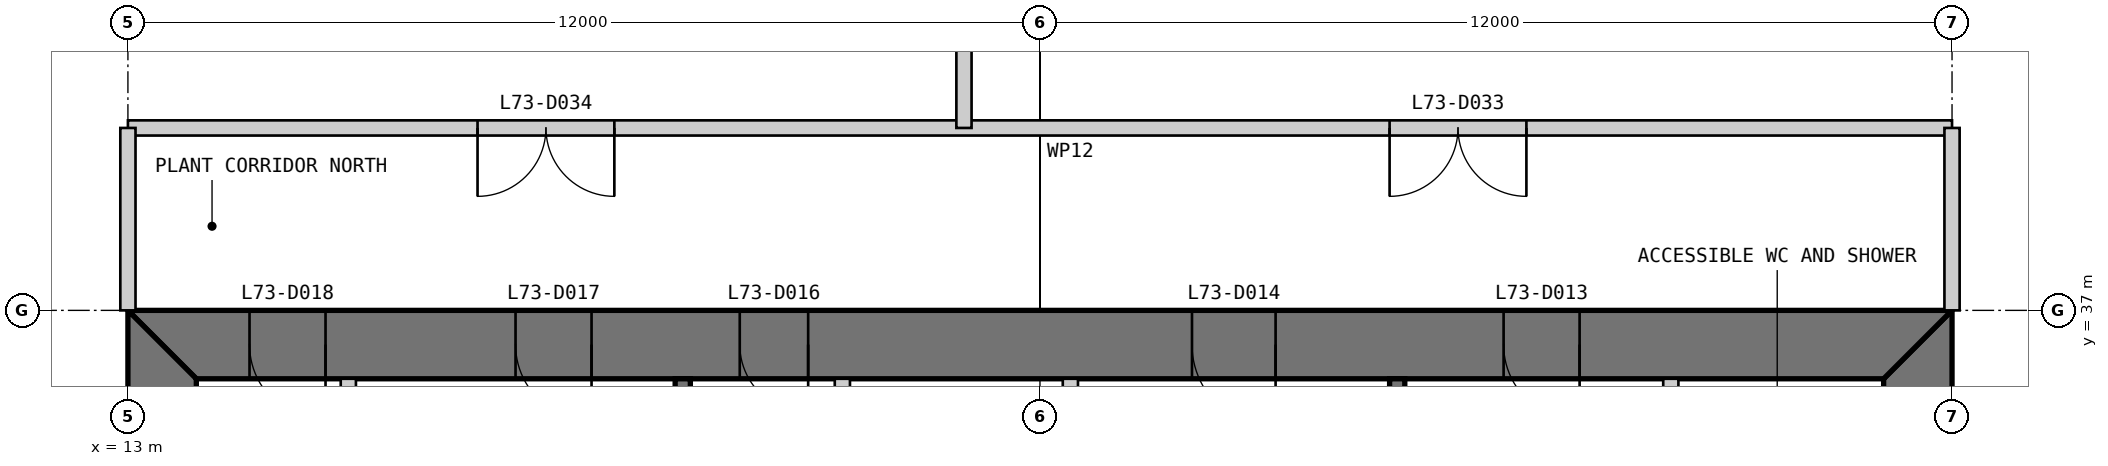
"""IFC4 building model, lengths in metres.
Left out: names, types, materials, properties, quantities, classifications, styles, units other than length and angle.
Written with IfcOpenShell. Run it as: python <this file> out.ifc"""

import sys

from ifc_helpers import new_model, si_unit, direction, frame, frame_2d, origin, place, context, subcontext, project, spatial, polyline, rectangle, outline, extrude, element, fill, save


model = new_model("IFC4")
c1 = context("Model", 3, precision=1e-05, world=origin(), true_north=direction((0.0, 1.0)))
c2 = subcontext(c1, "Body", "Model", "MODEL_VIEW")
j1 = project(units=[si_unit("LENGTHUNIT", "METRE"), si_unit("PLANEANGLEUNIT", "RADIAN")], contexts=[c1])
p1 = place(None, origin())
s1 = spatial("IfcSite", under=j1, at=p1, CompositionType="ELEMENT")
p2 = place(p1, origin())
s2 = spatial("IfcBuilding", under=s1, at=p2, CompositionType="ELEMENT")
p3 = place(p2, frame((0.0, 0.0, 301.8)))
s3 = spatial("IfcBuildingStorey", under=s2, at=p3, CompositionType="ELEMENT", Elevation=301.8)
p4 = place(p3, frame((36.55, 13.9, 0.0), z_axis=(0.0, 0.0, 1.0), x_axis=(0.0, 1.0, 0.0)))
e1 = element("IfcWall", 1, at=p4, inside=s3, PredefinedType="SHEAR", context=c2, shape_type="SweptSolid", body=[
    extrude(outline(polyline([(-0.9, -0.45), (23.1, -0.45), (22.2, 0.45), (0.0, 0.45), (-0.9, -0.45)])), origin(), (0.0, 0.0, 1.0), 6.0),
])
p5 = place(p4, frame((20.2, 0.0, 0.0)))
e2 = element("IfcOpeningElement", 2, at=p5, cuts=e1, PredefinedType="OPENING", context=c2, shape_type="SweptSolid", body=[
    extrude(rectangle(XDim=1.0, YDim=2.2, at=frame_2d((0.5, 1.1))), frame((0.0, 0.46, 0.0), z_axis=(0.0, -1.0, 0.0), x_axis=(1.0, 0.0, 0.0)), (0.0, 0.0, 1.0), 0.92),
])
p6 = place(p4, frame((17.25, 0.0, 0.0)))
e3 = element("IfcOpeningElement", 3, at=p6, cuts=e1, PredefinedType="OPENING", context=c2, shape_type="SweptSolid", body=[
    extrude(rectangle(XDim=0.9, YDim=2.2, at=frame_2d((0.45, 1.1))), frame((0.0, 0.46, 0.0), z_axis=(0.0, -1.0, 0.0), x_axis=(1.0, 0.0, 0.0)), (0.0, 0.0, 1.0), 0.92),
])
p7 = place(p3, frame((37.0, 36.55, 0.0), z_axis=(0.0, 0.0, 1.0), x_axis=(-1.0, 0.0, 0.0)))
e4 = element("IfcWall", 4, at=p7, inside=s3, PredefinedType="SHEAR", context=c2, shape_type="SweptSolid", body=[
    extrude(outline(polyline([(0.0, -0.45), (24.0, -0.45), (23.1, 0.45), (0.9, 0.45), (0.0, -0.45)])), origin(), (0.0, 0.0, 1.0), 6.0),
])
p8 = place(p7, frame((4.9, 0.0, 0.0)))
e5 = element("IfcOpeningElement", 5, at=p8, cuts=e4, PredefinedType="OPENING", context=c2, shape_type="SweptSolid", body=[
    extrude(rectangle(XDim=1.0, YDim=2.2, at=frame_2d((0.5, 1.1))), frame((0.0, 0.46, 0.0), z_axis=(0.0, -1.0, 0.0), x_axis=(1.0, 0.0, 0.0)), (0.0, 0.0, 1.0), 0.92),
])
p9 = place(p7, frame((8.9, 0.0, 0.0)))
e6 = element("IfcOpeningElement", 6, at=p9, cuts=e4, PredefinedType="OPENING", context=c2, shape_type="SweptSolid", body=[
    extrude(rectangle(XDim=1.1, YDim=2.2, at=frame_2d((0.55, 1.1))), frame((0.0, 0.46, 0.0), z_axis=(0.0, -1.0, 0.0), x_axis=(1.0, 0.0, 0.0)), (0.0, 0.0, 1.0), 0.92),
])
p10 = place(p7, frame((15.05, 0.0, 0.0)))
e7 = element("IfcOpeningElement", 7, at=p10, cuts=e4, PredefinedType="OPENING", context=c2, shape_type="SweptSolid", body=[
    extrude(rectangle(XDim=0.9, YDim=2.2, at=frame_2d((0.45, 1.1))), frame((0.0, 0.46, 0.0), z_axis=(0.0, -1.0, 0.0), x_axis=(1.0, 0.0, 0.0)), (0.0, 0.0, 1.0), 0.92),
])
p11 = place(p7, frame((17.9, 0.0, 0.0)))
e8 = element("IfcOpeningElement", 8, at=p11, cuts=e4, PredefinedType="OPENING", context=c2, shape_type="SweptSolid", body=[
    extrude(rectangle(XDim=1.0, YDim=2.2, at=frame_2d((0.5, 1.1))), frame((0.0, 0.46, 0.0), z_axis=(0.0, -1.0, 0.0), x_axis=(1.0, 0.0, 0.0)), (0.0, 0.0, 1.0), 0.92),
])
p12 = place(p7, frame((21.4, 0.0, 0.0)))
e9 = element("IfcOpeningElement", 9, at=p12, cuts=e4, PredefinedType="OPENING", context=c2, shape_type="SweptSolid", body=[
    extrude(rectangle(XDim=1.0, YDim=2.2, at=frame_2d((0.5, 1.1))), frame((0.0, 0.46, 0.0), z_axis=(0.0, -1.0, 0.0), x_axis=(1.0, 0.0, 0.0)), (0.0, 0.0, 1.0), 0.92),
])
p13 = place(p3, frame((13.45, 36.1, 0.0), z_axis=(0.0, 0.0, 1.0), x_axis=(0.0, -1.0, 0.0)))
e10 = element("IfcWall", 10, at=p13, inside=s3, PredefinedType="SHEAR", context=c2, shape_type="SweptSolid", body=[
    extrude(outline(polyline([(-0.9, -0.45), (23.1, -0.45), (22.2, 0.45), (0.0, 0.45), (-0.9, -0.45)])), origin(), (0.0, 0.0, 1.0), 6.0),
])
p14 = place(p13, frame((20.2, 0.0, 0.0)))
e11 = element("IfcOpeningElement", 11, at=p14, cuts=e10, PredefinedType="OPENING", context=c2, shape_type="SweptSolid", body=[
    extrude(rectangle(XDim=1.0, YDim=2.2, at=frame_2d((0.5, 1.1))), frame((0.0, 0.46, 0.0), z_axis=(0.0, -1.0, 0.0), x_axis=(1.0, 0.0, 0.0)), (0.0, 0.0, 1.0), 0.92),
])
p15 = place(p13, frame((17.25, 0.0, 0.0)))
e12 = element("IfcOpeningElement", 12, at=p15, cuts=e10, PredefinedType="OPENING", context=c2, shape_type="SweptSolid", body=[
    extrude(rectangle(XDim=0.9, YDim=2.2, at=frame_2d((0.45, 1.1))), frame((0.0, 0.46, 0.0), z_axis=(0.0, -1.0, 0.0), x_axis=(1.0, 0.0, 0.0)), (0.0, 0.0, 1.0), 0.92),
])
p16 = place(p3, frame((33.3, 36.1, 0.0), z_axis=(0.0, 0.0, 1.0), x_axis=(0.0, -1.0, 0.0)))
e13 = element("IfcWall", 13, at=p16, inside=s3, PredefinedType="PARTITIONING", context=c2, shape_type="SweptSolid", body=[
    extrude(rectangle(XDim=16.1, YDim=0.2, at=frame_2d((8.05, 0.0))), origin(), (0.0, 0.0, 1.0), 5.8),
])
p17 = place(p3, frame((29.7, 36.1, 0.0), z_axis=(0.0, 0.0, 1.0), x_axis=(0.0, -1.0, 0.0)))
e14 = element("IfcWall", 14, at=p17, inside=s3, PredefinedType="SOLIDWALL", context=c2, shape_type="SweptSolid", body=[
    extrude(rectangle(XDim=16.1, YDim=0.2, at=frame_2d((8.05, 0.0))), origin(), (0.0, 0.0, 1.0), 5.8),
])
p18 = place(p17, frame((6.4, 0.0, 0.0)))
e15 = element("IfcOpeningElement", 15, at=p18, cuts=e14, PredefinedType="OPENING", context=c2, shape_type="SweptSolid", body=[
    extrude(rectangle(XDim=0.9, YDim=2.2, at=frame_2d((0.45, 1.1))), frame((0.0, 0.11, 0.0), z_axis=(0.0, -1.0, 0.0), x_axis=(1.0, 0.0, 0.0)), (0.0, 0.0, 1.0), 0.22),
])
p19 = place(p17, frame((11.4, 0.0, 0.0)))
e16 = element("IfcOpeningElement", 16, at=p19, cuts=e14, PredefinedType="OPENING", context=c2, shape_type="SweptSolid", body=[
    extrude(rectangle(XDim=0.9, YDim=2.2, at=frame_2d((0.45, 1.1))), frame((0.0, 0.11, 0.0), z_axis=(0.0, -1.0, 0.0), x_axis=(1.0, 0.0, 0.0)), (0.0, 0.0, 1.0), 0.22),
])
p20 = place(p3, frame((25.4, 36.1, 0.0), z_axis=(0.0, 0.0, 1.0), x_axis=(0.0, -1.0, 0.0)))
e17 = element("IfcWall", 17, at=p20, inside=s3, PredefinedType="PARTITIONING", context=c2, shape_type="SweptSolid", body=[
    extrude(rectangle(XDim=3.3, YDim=0.2, at=frame_2d((1.65, 0.0))), origin(), (0.0, 0.0, 1.0), 5.8),
])
p21 = place(p20, frame((0.9, 0.0, 0.0)))
e18 = element("IfcOpeningElement", 18, at=p21, cuts=e17, PredefinedType="OPENING", context=c2, shape_type="SweptSolid", body=[
    extrude(rectangle(XDim=1.1, YDim=2.2, at=frame_2d((0.55, 1.1))), frame((0.0, 0.11, 0.0), z_axis=(0.0, -1.0, 0.0), x_axis=(1.0, 0.0, 0.0)), (0.0, 0.0, 1.0), 0.22),
])
p22 = place(p3, frame((22.4, 36.1, 0.0), z_axis=(0.0, 0.0, 1.0), x_axis=(0.0, -1.0, 0.0)))
e19 = element("IfcWall", 19, at=p22, inside=s3, PredefinedType="PARTITIONING", context=c2, shape_type="SweptSolid", body=[
    extrude(rectangle(XDim=3.3, YDim=0.2, at=frame_2d((1.65, 0.0))), origin(), (0.0, 0.0, 1.0), 5.8),
])
p23 = place(p3, frame((20.3, 36.1, 0.0), z_axis=(0.0, 0.0, 1.0), x_axis=(0.0, -1.0, 0.0)))
e20 = element("IfcWall", 20, at=p23, inside=s3, PredefinedType="SOLIDWALL", context=c2, shape_type="SweptSolid", body=[
    extrude(rectangle(XDim=6.1, YDim=0.2, at=frame_2d((3.05, 0.0))), origin(), (0.0, 0.0, 1.0), 5.8),
])
p24 = place(p3, frame((15.9, 36.1, 0.0), z_axis=(0.0, 0.0, 1.0), x_axis=(0.0, -1.0, 0.0)))
e21 = element("IfcWall", 21, at=p24, inside=s3, PredefinedType="PARTITIONING", context=c2, shape_type="SweptSolid", body=[
    extrude(rectangle(XDim=6.1, YDim=0.2, at=frame_2d((3.05, 0.0))), origin(), (0.0, 0.0, 1.0), 5.8),
])
p25 = place(p3, frame((13.0, 39.4, 0.0), z_axis=(0.0, 0.0, 1.0), x_axis=(1.0, 0.0, 0.0)))
e22 = element("IfcWall", 22, at=p25, inside=s3, PredefinedType="PARTITIONING", context=c2, shape_type="SweptSolid", body=[
    extrude(rectangle(XDim=24.0, YDim=0.2, at=frame_2d((12.0, 0.0))), origin(), (0.0, 0.0, 1.0), 5.8),
])
p26 = place(p25, frame((16.6, 0.0, 0.0)))
e23 = element("IfcOpeningElement", 23, at=p26, cuts=e22, PredefinedType="OPENING", context=c2, shape_type="SweptSolid", body=[
    extrude(rectangle(XDim=1.8, YDim=2.4, at=frame_2d((0.9, 1.2))), frame((0.0, 0.11, 0.0), z_axis=(0.0, -1.0, 0.0), x_axis=(1.0, 0.0, 0.0)), (0.0, 0.0, 1.0), 0.22),
])
p27 = place(p25, frame((4.6, 0.0, 0.0)))
e24 = element("IfcOpeningElement", 24, at=p27, cuts=e22, PredefinedType="OPENING", context=c2, shape_type="SweptSolid", body=[
    extrude(rectangle(XDim=1.8, YDim=2.4, at=frame_2d((0.9, 1.2))), frame((0.0, 0.11, 0.0), z_axis=(0.0, -1.0, 0.0), x_axis=(1.0, 0.0, 0.0)), (0.0, 0.0, 1.0), 0.22),
])
for number, where, z_axis, x_axis in (
    (25, (13.0, 37.0, 0.0), (0.0, 0.0, 1.0), (0.0, 1.0, 0.0)),
    (26, (37.0, 37.0, 0.0), (0.0, 0.0, 1.0), (0.0, 1.0, 0.0)),
):
    element("IfcWall", number, at=place(p3, frame(where, z_axis=z_axis, x_axis=x_axis)), inside=s3, PredefinedType="PARTITIONING", context=c2, shape_type="SweptSolid", body=[
        extrude(rectangle(XDim=2.4, YDim=0.2, at=frame_2d((1.2, 0.0))), origin(), (0.0, 0.0, 1.0), 4.853),
    ])
p28 = place(p3, frame((24.0, 39.4, 0.0), z_axis=(0.0, 0.0, 1.0), x_axis=(0.0, 1.0, 0.0)))
e27 = element("IfcWall", 27, at=p28, inside=s3, PredefinedType="PARTITIONING", context=c2, shape_type="SweptSolid", body=[
    extrude(rectangle(XDim=10.6, YDim=0.2, at=frame_2d((5.3, 0.0))), origin(), (0.0, 0.0, 1.0), 5.8),
])
p29 = place(p28, frame((4.4, 0.0, 0.0)))
e28 = element("IfcOpeningElement", 28, at=p29, cuts=e27, PredefinedType="OPENING", context=c2, shape_type="SweptSolid", body=[
    extrude(rectangle(XDim=1.8, YDim=2.4, at=frame_2d((0.9, 1.2))), frame((0.0, 0.11, 0.0), z_axis=(0.0, -1.0, 0.0), x_axis=(1.0, 0.0, 0.0)), (0.0, 0.0, 1.0), 0.22),
])
p30 = place(p8, origin())
e29 = element("IfcDoor", 29, at=p30, inside=s3, OperationType="SINGLE_SWING_LEFT", PredefinedType="DOOR", context=c2, shape_type="SweptSolid", body=[
    extrude(rectangle(XDim=1.0, YDim=2.2, at=frame_2d((0.5, 1.1))), frame((0.0, 0.025, 0.0), z_axis=(0.0, -1.0, 0.0), x_axis=(1.0, 0.0, 0.0)), (0.0, 0.0, 1.0), 0.05),
    extrude(outline(polyline([(0.0, 0.0), (0.04, 0.0), (0.04, 2.16), (0.96, 2.16), (0.96, 0.0), (1.0, 0.0), (1.0, 2.2), (0.0, 2.2), (0.0, 0.0)])), frame((0.0, 0.3, 0.0), z_axis=(0.0, -1.0, 0.0), x_axis=(1.0, 0.0, 0.0)), (0.0, 0.0, 1.0), 0.6),
])
fill(e5, e29)
p31 = place(p9, origin())
e30 = element("IfcDoor", 30, at=p31, inside=s3, OperationType="SINGLE_SWING_LEFT", PredefinedType="DOOR", context=c2, shape_type="SweptSolid", body=[
    extrude(rectangle(XDim=1.1, YDim=2.2, at=frame_2d((0.55, 1.1))), frame((0.0, 0.025, 0.0), z_axis=(0.0, -1.0, 0.0), x_axis=(1.0, 0.0, 0.0)), (0.0, 0.0, 1.0), 0.05),
    extrude(outline(polyline([(0.0, 0.0), (0.04, 0.0), (0.04, 2.16), (1.06, 2.16), (1.06, 0.0), (1.1, 0.0), (1.1, 2.2), (0.0, 2.2), (0.0, 0.0)])), frame((0.0, 0.3, 0.0), z_axis=(0.0, -1.0, 0.0), x_axis=(1.0, 0.0, 0.0)), (0.0, 0.0, 1.0), 0.6),
])
fill(e6, e30)
p32 = place(p10, origin())
e31 = element("IfcDoor", 31, at=p32, inside=s3, OperationType="SINGLE_SWING_LEFT", PredefinedType="DOOR", context=c2, shape_type="SweptSolid", body=[
    extrude(rectangle(XDim=0.9, YDim=2.2, at=frame_2d((0.45, 1.1))), frame((0.0, 0.025, 0.0), z_axis=(0.0, -1.0, 0.0), x_axis=(1.0, 0.0, 0.0)), (0.0, 0.0, 1.0), 0.05),
    extrude(outline(polyline([(0.0, 0.0), (0.04, 0.0), (0.04, 2.16), (0.86, 2.16), (0.86, 0.0), (0.9, 0.0), (0.9, 2.2), (0.0, 2.2), (0.0, 0.0)])), frame((0.0, 0.3, 0.0), z_axis=(0.0, -1.0, 0.0), x_axis=(1.0, 0.0, 0.0)), (0.0, 0.0, 1.0), 0.6),
])
fill(e7, e31)
p33 = place(p11, origin())
e32 = element("IfcDoor", 32, at=p33, inside=s3, OperationType="SINGLE_SWING_LEFT", PredefinedType="DOOR", context=c2, shape_type="SweptSolid", body=[
    extrude(rectangle(XDim=1.0, YDim=2.2, at=frame_2d((0.5, 1.1))), frame((0.0, 0.025, 0.0), z_axis=(0.0, -1.0, 0.0), x_axis=(1.0, 0.0, 0.0)), (0.0, 0.0, 1.0), 0.05),
    extrude(outline(polyline([(0.0, 0.0), (0.04, 0.0), (0.04, 2.16), (0.96, 2.16), (0.96, 0.0), (1.0, 0.0), (1.0, 2.2), (0.0, 2.2), (0.0, 0.0)])), frame((0.0, 0.3, 0.0), z_axis=(0.0, -1.0, 0.0), x_axis=(1.0, 0.0, 0.0)), (0.0, 0.0, 1.0), 0.6),
])
fill(e8, e32)
p34 = place(p12, origin())
e33 = element("IfcDoor", 33, at=p34, inside=s3, OperationType="SINGLE_SWING_LEFT", PredefinedType="DOOR", context=c2, shape_type="SweptSolid", body=[
    extrude(rectangle(XDim=1.0, YDim=2.2, at=frame_2d((0.5, 1.1))), frame((0.0, 0.025, 0.0), z_axis=(0.0, -1.0, 0.0), x_axis=(1.0, 0.0, 0.0)), (0.0, 0.0, 1.0), 0.05),
    extrude(outline(polyline([(0.0, 0.0), (0.04, 0.0), (0.04, 2.16), (0.96, 2.16), (0.96, 0.0), (1.0, 0.0), (1.0, 2.2), (0.0, 2.2), (0.0, 0.0)])), frame((0.0, 0.3, 0.0), z_axis=(0.0, -1.0, 0.0), x_axis=(1.0, 0.0, 0.0)), (0.0, 0.0, 1.0), 0.6),
])
fill(e9, e33)
p35 = place(p26, frame((1.8, 0.0, 0.0), z_axis=(0.0, 0.0, 1.0), x_axis=(-1.0, 0.0, 0.0)))
e34 = element("IfcDoor", 34, at=p35, inside=s3, OperationType="DOUBLE_DOOR_SINGLE_SWING", PredefinedType="DOOR", context=c2, shape_type="SweptSolid", body=[
    extrude(rectangle(XDim=1.8, YDim=2.4, at=frame_2d((0.9, 1.2))), frame((0.0, 0.025, 0.0), z_axis=(0.0, -1.0, 0.0), x_axis=(1.0, 0.0, 0.0)), (0.0, 0.0, 1.0), 0.05),
])
fill(e23, e34)
p36 = place(p27, frame((1.8, 0.0, 0.0), z_axis=(0.0, 0.0, 1.0), x_axis=(-1.0, 0.0, 0.0)))
e35 = element("IfcDoor", 35, at=p36, inside=s3, OperationType="DOUBLE_DOOR_SINGLE_SWING", PredefinedType="DOOR", context=c2, shape_type="SweptSolid", body=[
    extrude(rectangle(XDim=1.8, YDim=2.4, at=frame_2d((0.9, 1.2))), frame((0.0, 0.025, 0.0), z_axis=(0.0, -1.0, 0.0), x_axis=(1.0, 0.0, 0.0)), (0.0, 0.0, 1.0), 0.05),
])
fill(e24, e35)
save(model, sys.argv[1])
